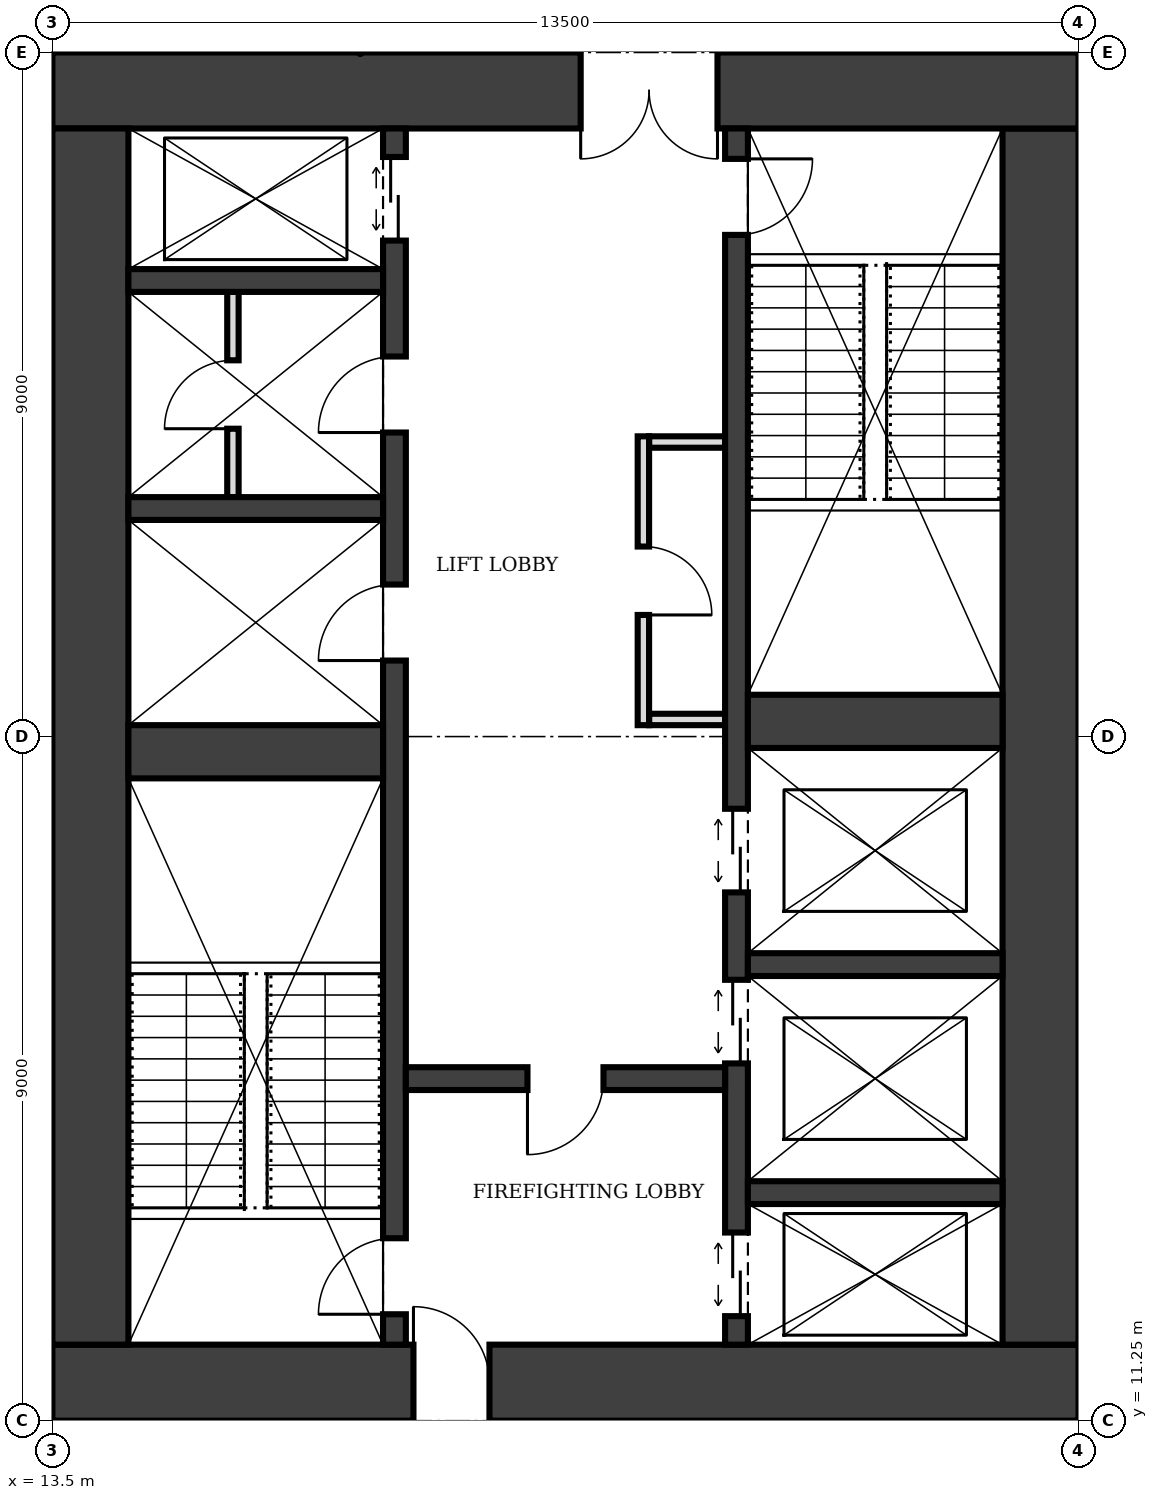
"""IFC4 building model, lengths in metres.
Left out: names, types, materials, properties, quantities, classifications, styles, units other than length and angle.
Written with IfcOpenShell. Run it as: python <this file> out.ifc"""

import sys

from ifc_helpers import new_model, si_unit, direction, frame, frame_2d, origin, place, context, subcontext, project, spatial, rectangle, extrude, element, fill, save


model = new_model("IFC4")
c1 = context("Model", 3, precision=1e-05, world=origin(), true_north=direction((0.0, 1.0)))
c2 = subcontext(c1, "Body", "Model", "MODEL_VIEW")
j1 = project(units=[si_unit("LENGTHUNIT", "METRE"), si_unit("PLANEANGLEUNIT", "RADIAN")], contexts=[c1])
p1 = place(None, origin())
s1 = spatial("IfcSite", under=j1, at=p1, CompositionType="ELEMENT")
p2 = place(p1, origin())
s2 = spatial("IfcBuilding", under=s1, at=p2, CompositionType="ELEMENT")
p3 = place(p2, frame((0.0, 0.0, 225.0)))
s3 = spatial("IfcBuildingStorey", under=s2, at=p3, CompositionType="ELEMENT", Elevation=225.0)
p4 = place(p3, frame((13.5, 11.75, 0.0), z_axis=(0.0, 0.0, 1.0), x_axis=(1.0, 0.0, 0.0)))
e1 = element("IfcWall", 1, at=p4, inside=s3, PredefinedType="SHEAR", context=c2, shape_type="SweptSolid", body=[
    extrude(rectangle(XDim=13.5, YDim=1.0, at=frame_2d((6.75, 0.0))), origin(), (0.0, 0.0, 1.0), 4.0),
])
p5 = place(p4, frame((4.75, 0.0, 0.0)))
e2 = element("IfcOpeningElement", 2, at=p5, cuts=e1, PredefinedType="OPENING", context=c2, shape_type="SweptSolid", body=[
    extrude(rectangle(XDim=1.0, YDim=2.1, at=frame_2d((0.5, 1.05))), frame((0.0, 0.51, 0.0), z_axis=(0.0, -1.0, 0.0), x_axis=(1.0, 0.0, 0.0)), (0.0, 0.0, 1.0), 1.02),
])
p6 = place(p3, frame((26.5, 12.25, 0.0), z_axis=(0.0, 0.0, 1.0), x_axis=(0.0, 1.0, 0.0)))
e3 = element("IfcWall", 3, at=p6, inside=s3, PredefinedType="SHEAR", context=c2, shape_type="SweptSolid", body=[
    extrude(rectangle(XDim=16.0, YDim=1.0, at=frame_2d((8.0, 0.0))), origin(), (0.0, 0.0, 1.0), 4.0),
])
p7 = place(p3, frame((27.0, 28.75, 0.0), z_axis=(0.0, 0.0, 1.0), x_axis=(-1.0, 0.0, 0.0)))
e4 = element("IfcWall", 4, at=p7, inside=s3, PredefinedType="SHEAR", context=c2, shape_type="SweptSolid", body=[
    extrude(rectangle(XDim=13.5, YDim=1.0, at=frame_2d((6.75, 0.0))), origin(), (0.0, 0.0, 1.0), 4.0),
])
p8 = place(p7, frame((4.75, 0.0, 0.0)))
e5 = element("IfcOpeningElement", 5, at=p8, cuts=e4, PredefinedType="OPENING", context=c2, shape_type="SweptSolid", body=[
    extrude(rectangle(XDim=1.8, YDim=2.1, at=frame_2d((0.9, 1.05))), frame((0.0, 0.51, 0.0), z_axis=(0.0, -1.0, 0.0), x_axis=(1.0, 0.0, 0.0)), (0.0, 0.0, 1.0), 1.02),
])
p9 = place(p3, frame((14.0, 28.25, 0.0), z_axis=(0.0, 0.0, 1.0), x_axis=(0.0, -1.0, 0.0)))
e6 = element("IfcWall", 6, at=p9, inside=s3, PredefinedType="SHEAR", context=c2, shape_type="SweptSolid", body=[
    extrude(rectangle(XDim=16.0, YDim=1.0, at=frame_2d((8.0, 0.0))), origin(), (0.0, 0.0, 1.0), 4.0),
])
p10 = place(p3, frame((18.0, 12.25, 0.0), z_axis=(0.0, 0.0, 1.0), x_axis=(0.0, 1.0, 0.0)))
e7 = element("IfcWall", 7, at=p10, inside=s3, PredefinedType="SHEAR", context=c2, shape_type="SweptSolid", body=[
    extrude(rectangle(XDim=16.0, YDim=0.3, at=frame_2d((8.0, 0.0))), origin(), (0.0, 0.0, 1.0), 4.0),
])
p11 = place(p10, frame((0.4, 0.0, 0.0)))
e8 = element("IfcOpeningElement", 8, at=p11, cuts=e7, PredefinedType="OPENING", context=c2, shape_type="SweptSolid", body=[
    extrude(rectangle(XDim=1.0, YDim=2.1, at=frame_2d((0.5, 1.05))), frame((0.0, 0.16, 0.0), z_axis=(0.0, -1.0, 0.0), x_axis=(1.0, 0.0, 0.0)), (0.0, 0.0, 1.0), 0.32),
])
p12 = place(p10, frame((14.525, 0.0, 0.0)))
e9 = element("IfcOpeningElement", 9, at=p12, cuts=e7, PredefinedType="OPENING", context=c2, shape_type="SweptSolid", body=[
    extrude(rectangle(XDim=1.1, YDim=2.1, at=frame_2d((0.55, 1.05))), frame((0.0, 0.16, 0.0), z_axis=(0.0, -1.0, 0.0), x_axis=(1.0, 0.0, 0.0)), (0.0, 0.0, 1.0), 0.32),
])
p13 = place(p10, frame((9.0, 0.0, 0.0)))
e10 = element("IfcOpeningElement", 10, at=p13, cuts=e7, PredefinedType="OPENING", context=c2, shape_type="SweptSolid", body=[
    extrude(rectangle(XDim=1.0, YDim=2.1, at=frame_2d((0.5, 1.05))), frame((0.0, 0.16, 0.0), z_axis=(0.0, -1.0, 0.0), x_axis=(1.0, 0.0, 0.0)), (0.0, 0.0, 1.0), 0.32),
])
p14 = place(p10, frame((12.0, 0.0, 0.0)))
e11 = element("IfcOpeningElement", 11, at=p14, cuts=e7, PredefinedType="OPENING", context=c2, shape_type="SweptSolid", body=[
    extrude(rectangle(XDim=1.0, YDim=2.1, at=frame_2d((0.5, 1.05))), frame((0.0, 0.16, 0.0), z_axis=(0.0, -1.0, 0.0), x_axis=(1.0, 0.0, 0.0)), (0.0, 0.0, 1.0), 0.32),
])
p15 = place(p3, frame((22.5, 12.25, 0.0), z_axis=(0.0, 0.0, 1.0), x_axis=(0.0, 1.0, 0.0)))
e12 = element("IfcWall", 12, at=p15, inside=s3, PredefinedType="SHEAR", context=c2, shape_type="SweptSolid", body=[
    extrude(rectangle(XDim=16.0, YDim=0.3, at=frame_2d((8.0, 0.0))), origin(), (0.0, 0.0, 1.0), 4.0),
])
p16 = place(p15, frame((14.6, 0.0, 0.0)))
e13 = element("IfcOpeningElement", 13, at=p16, cuts=e12, PredefinedType="OPENING", context=c2, shape_type="SweptSolid", body=[
    extrude(rectangle(XDim=1.0, YDim=2.1, at=frame_2d((0.5, 1.05))), frame((0.0, 0.16, 0.0), z_axis=(0.0, -1.0, 0.0), x_axis=(1.0, 0.0, 0.0)), (0.0, 0.0, 1.0), 0.32),
])
p17 = place(p15, frame((0.375, 0.0, 0.0)))
e14 = element("IfcOpeningElement", 14, at=p17, cuts=e12, PredefinedType="OPENING", context=c2, shape_type="SweptSolid", body=[
    extrude(rectangle(XDim=1.1, YDim=2.1, at=frame_2d((0.55, 1.05))), frame((0.0, 0.16, 0.0), z_axis=(0.0, -1.0, 0.0), x_axis=(1.0, 0.0, 0.0)), (0.0, 0.0, 1.0), 0.32),
])
p18 = place(p15, frame((3.7, 0.0, 0.0)))
e15 = element("IfcOpeningElement", 15, at=p18, cuts=e12, PredefinedType="OPENING", context=c2, shape_type="SweptSolid", body=[
    extrude(rectangle(XDim=1.1, YDim=2.1, at=frame_2d((0.55, 1.05))), frame((0.0, 0.16, 0.0), z_axis=(0.0, -1.0, 0.0), x_axis=(1.0, 0.0, 0.0)), (0.0, 0.0, 1.0), 0.32),
])
p19 = place(p15, frame((5.95, 0.0, 0.0)))
e16 = element("IfcOpeningElement", 16, at=p19, cuts=e12, PredefinedType="OPENING", context=c2, shape_type="SweptSolid", body=[
    extrude(rectangle(XDim=1.1, YDim=2.1, at=frame_2d((0.55, 1.05))), frame((0.0, 0.16, 0.0), z_axis=(0.0, -1.0, 0.0), x_axis=(1.0, 0.0, 0.0)), (0.0, 0.0, 1.0), 0.32),
])
p20 = place(p3, frame((14.5, 20.05, 0.0), z_axis=(0.0, 0.0, 1.0), x_axis=(1.0, 0.0, 0.0)))
e17 = element("IfcWall", 17, at=p20, inside=s3, PredefinedType="SHEAR", context=c2, shape_type="SweptSolid", body=[
    extrude(rectangle(XDim=3.35, YDim=0.7, at=frame_2d((1.675, 0.0))), origin(), (0.0, 0.0, 1.0), 4.0),
])
p21 = place(p3, frame((18.15, 15.75, 0.0), z_axis=(0.0, 0.0, 1.0), x_axis=(1.0, 0.0, 0.0)))
e18 = element("IfcWall", 18, at=p21, inside=s3, PredefinedType="SHEAR", context=c2, shape_type="SweptSolid", body=[
    extrude(rectangle(XDim=4.2, YDim=0.3, at=frame_2d((2.1, 0.0))), origin(), (0.0, 0.0, 1.0), 4.0),
])
p22 = place(p21, frame((1.6, 0.0, 0.0)))
e19 = element("IfcOpeningElement", 19, at=p22, cuts=e18, PredefinedType="OPENING", context=c2, shape_type="SweptSolid", body=[
    extrude(rectangle(XDim=1.0, YDim=2.1, at=frame_2d((0.5, 1.05))), frame((0.0, 0.16, 0.0), z_axis=(0.0, -1.0, 0.0), x_axis=(1.0, 0.0, 0.0)), (0.0, 0.0, 1.0), 0.32),
])
for number, where, z_axis, x_axis in (
    (20, (22.65, 14.25, 0.0), (0.0, 0.0, 1.0), (1.0, 0.0, 0.0)),
    (21, (22.65, 17.25, 0.0), (0.0, 0.0, 1.0), (1.0, 0.0, 0.0)),
):
    element("IfcWall", number, at=place(p3, frame(where, z_axis=z_axis, x_axis=x_axis)), inside=s3, PredefinedType="SHEAR", context=c2, shape_type="SweptSolid", body=[
        extrude(rectangle(XDim=3.35, YDim=0.3, at=frame_2d((1.675, 0.0))), origin(), (0.0, 0.0, 1.0), 4.0),
    ])
p23 = place(p3, frame((22.65, 20.45, 0.0), z_axis=(0.0, 0.0, 1.0), x_axis=(1.0, 0.0, 0.0)))
e22 = element("IfcWall", 22, at=p23, inside=s3, PredefinedType="SHEAR", context=c2, shape_type="SweptSolid", body=[
    extrude(rectangle(XDim=3.35, YDim=0.7, at=frame_2d((1.675, 0.0))), origin(), (0.0, 0.0, 1.0), 4.0),
])
for number, where, z_axis, x_axis in (
    (23, (14.5, 23.25, 0.0), (0.0, 0.0, 1.0), (1.0, 0.0, 0.0)),
    (24, (14.5, 26.25, 0.0), (0.0, 0.0, 1.0), (1.0, 0.0, 0.0)),
):
    element("IfcWall", number, at=place(p3, frame(where, z_axis=z_axis, x_axis=x_axis)), inside=s3, PredefinedType="SHEAR", context=c2, shape_type="SweptSolid", body=[
        extrude(rectangle(XDim=3.35, YDim=0.3, at=frame_2d((1.675, 0.0))), origin(), (0.0, 0.0, 1.0), 4.0),
    ])
p24 = place(p3, frame((21.275, 20.4, 0.0), z_axis=(0.0, 0.0, 1.0), x_axis=(0.0, 1.0, 0.0)))
e25 = element("IfcWall", 25, at=p24, inside=s3, PredefinedType="PARTITIONING", context=c2, shape_type="SweptSolid", body=[
    extrude(rectangle(XDim=3.8, YDim=0.15, at=frame_2d((1.9, 0.0))), origin(), (0.0, 0.0, 1.0), 3.75),
])
p25 = place(p24, frame((1.45, 0.0, 0.0)))
e26 = element("IfcOpeningElement", 26, at=p25, cuts=e25, PredefinedType="OPENING", context=c2, shape_type="SweptSolid", body=[
    extrude(rectangle(XDim=0.9, YDim=2.1, at=frame_2d((0.45, 1.05))), frame((0.0, 0.085, 0.0), z_axis=(0.0, -1.0, 0.0), x_axis=(1.0, 0.0, 0.0)), (0.0, 0.0, 1.0), 0.17),
])
for number, where, z_axis, x_axis in (
    (27, (21.35, 20.475, 0.0), (0.0, 0.0, 1.0), (1.0, 0.0, 0.0)),
    (28, (21.35, 24.125, 0.0), (0.0, 0.0, 1.0), (1.0, 0.0, 0.0)),
):
    element("IfcWall", number, at=place(p3, frame(where, z_axis=z_axis, x_axis=x_axis)), inside=s3, PredefinedType="PARTITIONING", context=c2, shape_type="SweptSolid", body=[
        extrude(rectangle(XDim=1.0, YDim=0.15, at=frame_2d((0.5, 0.0))), origin(), (0.0, 0.0, 1.0), 3.75),
    ])
p26 = place(p3, frame((15.875, 23.4, 0.0), z_axis=(0.0, 0.0, 1.0), x_axis=(0.0, 1.0, 0.0)))
e29 = element("IfcWall", 29, at=p26, inside=s3, PredefinedType="PARTITIONING", context=c2, shape_type="SweptSolid", body=[
    extrude(rectangle(XDim=2.7, YDim=0.15, at=frame_2d((1.35, 0.0))), origin(), (0.0, 0.0, 1.0), 3.75),
])
p27 = place(p26, frame((0.9, 0.0, 0.0)))
e30 = element("IfcOpeningElement", 30, at=p27, cuts=e29, PredefinedType="OPENING", context=c2, shape_type="SweptSolid", body=[
    extrude(rectangle(XDim=0.9, YDim=2.1, at=frame_2d((0.45, 1.05))), frame((0.0, 0.085, 0.0), z_axis=(0.0, -1.0, 0.0), x_axis=(1.0, 0.0, 0.0)), (0.0, 0.0, 1.0), 0.17),
])
p28 = place(p5, origin())
e31 = element("IfcDoor", 31, at=p28, inside=s3, OperationType="SINGLE_SWING_LEFT", PredefinedType="DOOR", context=c2, shape_type="SweptSolid", body=[
    extrude(rectangle(XDim=1.0, YDim=2.1, at=frame_2d((0.5, 1.05))), frame((0.0, 0.025, 0.0), z_axis=(0.0, -1.0, 0.0), x_axis=(1.0, 0.0, 0.0)), (0.0, 0.0, 1.0), 0.05),
])
fill(e2, e31)
p29 = place(p8, origin())
e32 = element("IfcDoor", 32, at=p29, inside=s3, OperationType="DOUBLE_DOOR_SINGLE_SWING", PredefinedType="DOOR", context=c2, shape_type="SweptSolid", body=[
    extrude(rectangle(XDim=1.8, YDim=2.1, at=frame_2d((0.9, 1.05))), frame((0.0, 0.025, 0.0), z_axis=(0.0, -1.0, 0.0), x_axis=(1.0, 0.0, 0.0)), (0.0, 0.0, 1.0), 0.05),
])
fill(e5, e32)
p30 = place(p22, frame((1.0, 0.0, 0.0), z_axis=(0.0, 0.0, 1.0), x_axis=(-1.0, 0.0, 0.0)))
e33 = element("IfcDoor", 33, at=p30, inside=s3, OperationType="SINGLE_SWING_RIGHT", PredefinedType="DOOR", context=c2, shape_type="SweptSolid", body=[
    extrude(rectangle(XDim=1.0, YDim=2.1, at=frame_2d((0.5, 1.05))), frame((0.0, 0.025, 0.0), z_axis=(0.0, -1.0, 0.0), x_axis=(1.0, 0.0, 0.0)), (0.0, 0.0, 1.0), 0.05),
])
fill(e19, e33)
p31 = place(p11, origin())
e34 = element("IfcDoor", 34, at=p31, inside=s3, OperationType="SINGLE_SWING_LEFT", PredefinedType="DOOR", context=c2, shape_type="SweptSolid", body=[
    extrude(rectangle(XDim=1.0, YDim=2.1, at=frame_2d((0.5, 1.05))), frame((0.0, 0.025, 0.0), z_axis=(0.0, -1.0, 0.0), x_axis=(1.0, 0.0, 0.0)), (0.0, 0.0, 1.0), 0.05),
])
fill(e8, e34)
p32 = place(p16, frame((1.0, 0.0, 0.0), z_axis=(0.0, 0.0, 1.0), x_axis=(-1.0, 0.0, 0.0)))
e35 = element("IfcDoor", 35, at=p32, inside=s3, OperationType="SINGLE_SWING_LEFT", PredefinedType="DOOR", context=c2, shape_type="SweptSolid", body=[
    extrude(rectangle(XDim=1.0, YDim=2.1, at=frame_2d((0.5, 1.05))), frame((0.0, 0.025, 0.0), z_axis=(0.0, -1.0, 0.0), x_axis=(1.0, 0.0, 0.0)), (0.0, 0.0, 1.0), 0.05),
])
fill(e13, e35)
p33 = place(p17, origin())
e36 = element("IfcDoor", 36, at=p33, inside=s3, OperationType="DOUBLE_DOOR_SLIDING", PredefinedType="DOOR", context=c2, shape_type="SweptSolid", body=[
    extrude(rectangle(XDim=1.1, YDim=2.1, at=frame_2d((0.55, 1.05))), frame((0.0, 0.025, 0.0), z_axis=(0.0, -1.0, 0.0), x_axis=(1.0, 0.0, 0.0)), (0.0, 0.0, 1.0), 0.05),
])
fill(e14, e36)
p34 = place(p12, origin())
e37 = element("IfcDoor", 37, at=p34, inside=s3, OperationType="DOUBLE_DOOR_SLIDING", PredefinedType="DOOR", context=c2, shape_type="SweptSolid", body=[
    extrude(rectangle(XDim=1.1, YDim=2.1, at=frame_2d((0.55, 1.05))), frame((0.0, 0.025, 0.0), z_axis=(0.0, -1.0, 0.0), x_axis=(1.0, 0.0, 0.0)), (0.0, 0.0, 1.0), 0.05),
])
fill(e9, e37)
p35 = place(p18, origin())
e38 = element("IfcDoor", 38, at=p35, inside=s3, OperationType="DOUBLE_DOOR_SLIDING", PredefinedType="DOOR", context=c2, shape_type="SweptSolid", body=[
    extrude(rectangle(XDim=1.1, YDim=2.1, at=frame_2d((0.55, 1.05))), frame((0.0, 0.025, 0.0), z_axis=(0.0, -1.0, 0.0), x_axis=(1.0, 0.0, 0.0)), (0.0, 0.0, 1.0), 0.05),
])
fill(e15, e38)
p36 = place(p19, origin())
e39 = element("IfcDoor", 39, at=p36, inside=s3, OperationType="DOUBLE_DOOR_SLIDING", PredefinedType="DOOR", context=c2, shape_type="SweptSolid", body=[
    extrude(rectangle(XDim=1.1, YDim=2.1, at=frame_2d((0.55, 1.05))), frame((0.0, 0.025, 0.0), z_axis=(0.0, -1.0, 0.0), x_axis=(1.0, 0.0, 0.0)), (0.0, 0.0, 1.0), 0.05),
])
fill(e16, e39)
p37 = place(p25, frame((0.9, 0.0, 0.0), z_axis=(0.0, 0.0, 1.0), x_axis=(-1.0, 0.0, 0.0)))
e40 = element("IfcDoor", 40, at=p37, inside=s3, OperationType="SINGLE_SWING_RIGHT", PredefinedType="DOOR", context=c2, shape_type="SweptSolid", body=[
    extrude(rectangle(XDim=0.9, YDim=2.1, at=frame_2d((0.45, 1.05))), frame((0.0, 0.025, 0.0), z_axis=(0.0, -1.0, 0.0), x_axis=(1.0, 0.0, 0.0)), (0.0, 0.0, 1.0), 0.05),
])
fill(e26, e40)
p38 = place(p13, origin())
e41 = element("IfcDoor", 41, at=p38, inside=s3, OperationType="SINGLE_SWING_LEFT", PredefinedType="DOOR", context=c2, shape_type="SweptSolid", body=[
    extrude(rectangle(XDim=1.0, YDim=2.1, at=frame_2d((0.5, 1.05))), frame((0.0, 0.025, 0.0), z_axis=(0.0, -1.0, 0.0), x_axis=(1.0, 0.0, 0.0)), (0.0, 0.0, 1.0), 0.05),
])
fill(e10, e41)
p39 = place(p14, origin())
e42 = element("IfcDoor", 42, at=p39, inside=s3, OperationType="SINGLE_SWING_LEFT", PredefinedType="DOOR", context=c2, shape_type="SweptSolid", body=[
    extrude(rectangle(XDim=1.0, YDim=2.1, at=frame_2d((0.5, 1.05))), frame((0.0, 0.025, 0.0), z_axis=(0.0, -1.0, 0.0), x_axis=(1.0, 0.0, 0.0)), (0.0, 0.0, 1.0), 0.05),
])
fill(e11, e42)
p40 = place(p27, origin())
e43 = element("IfcDoor", 43, at=p40, inside=s3, OperationType="SINGLE_SWING_LEFT", PredefinedType="DOOR", context=c2, shape_type="SweptSolid", body=[
    extrude(rectangle(XDim=0.9, YDim=2.1, at=frame_2d((0.45, 1.05))), frame((0.0, 0.025, 0.0), z_axis=(0.0, -1.0, 0.0), x_axis=(1.0, 0.0, 0.0)), (0.0, 0.0, 1.0), 0.05),
])
fill(e30, e43)
save(model, sys.argv[1])
